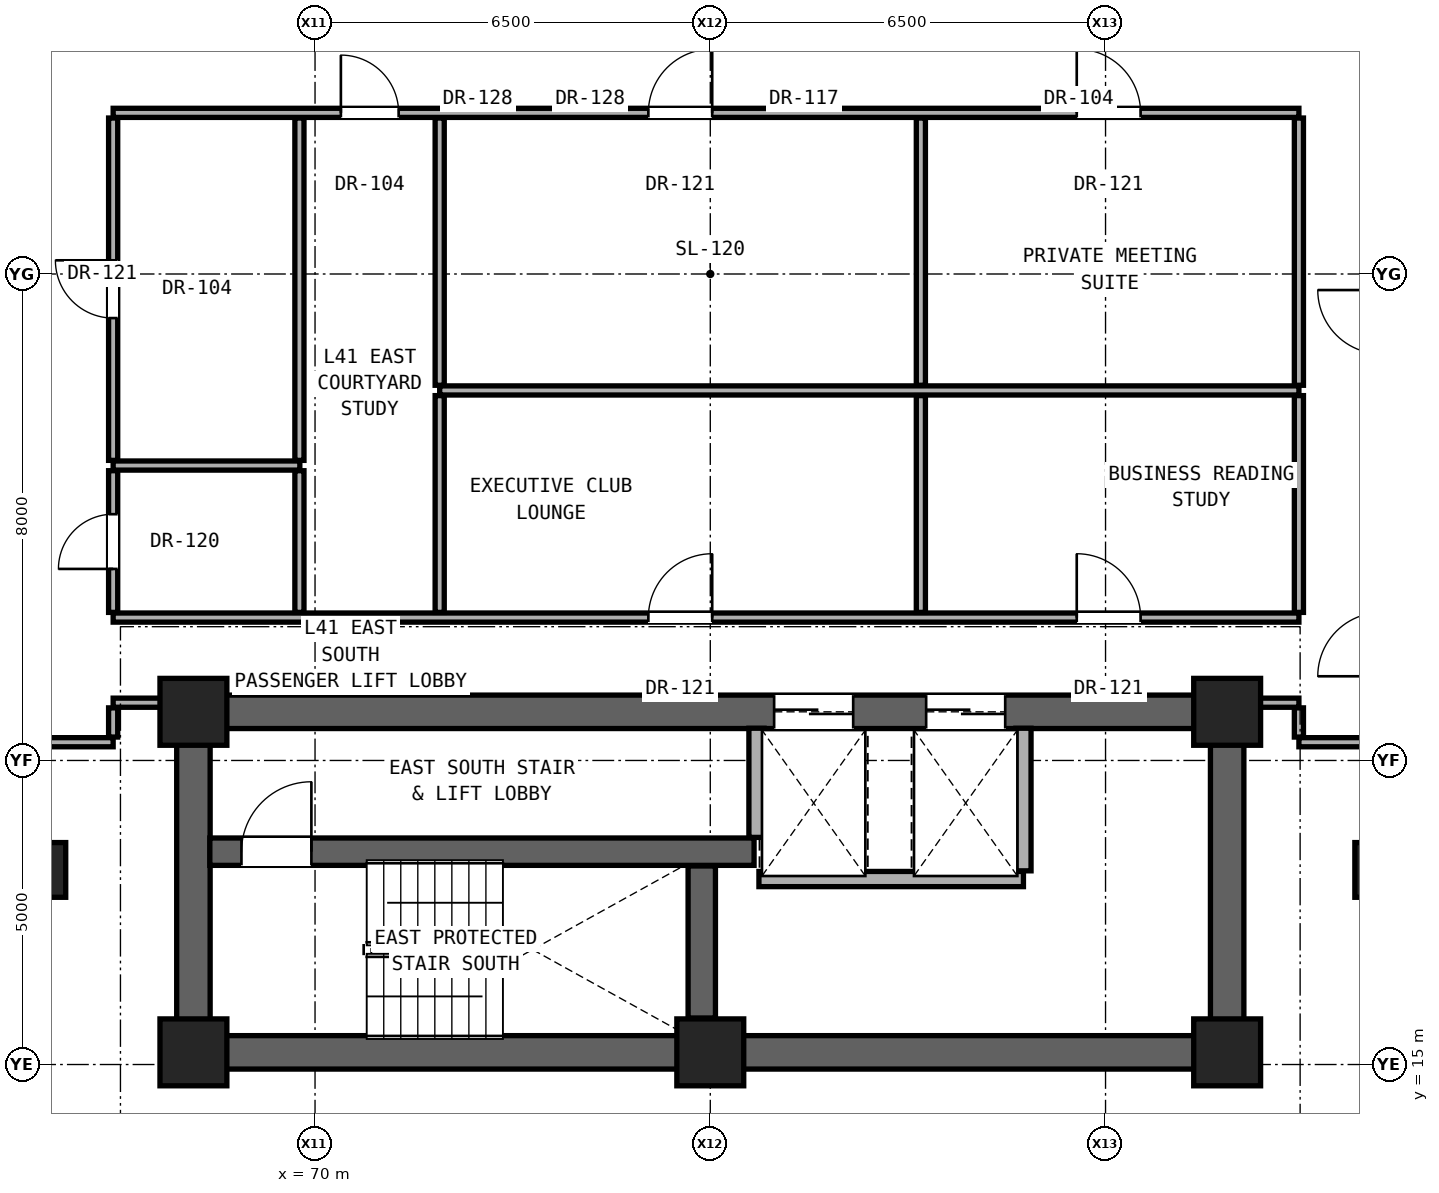
"""IFC4 building model, lengths in metres.
Left out: names, types, materials, properties, quantities, classifications, styles, units other than length and angle.
Written with IfcOpenShell. Run it as: python <this file> out.ifc"""

import sys

from ifc_helpers import new_model, si_unit, direction, frame, frame_2d, origin, origin_2d, place, context, subcontext, project, spatial, rectangle, extrude, element, fill, save


model = new_model("IFC4")
c1 = context("Model", 3, precision=1e-05, world=origin(), true_north=direction((0.0, 1.0)))
c2 = subcontext(c1, "Body", "Model", "MODEL_VIEW")
j1 = project(units=[si_unit("LENGTHUNIT", "METRE"), si_unit("PLANEANGLEUNIT", "RADIAN")], contexts=[c1])
p1 = place(None, origin())
s1 = spatial("IfcSite", under=j1, at=p1, CompositionType="ELEMENT")
p2 = place(p1, origin())
s2 = spatial("IfcBuilding", under=s1, at=p2, CompositionType="ELEMENT")
p3 = place(p2, frame((0.0, 0.0, 144.5)))
s3 = spatial("IfcBuildingStorey", under=s2, at=p3, CompositionType="ELEMENT", Elevation=144.5)
for number, where, z_axis, x_axis in (
    (1, (68.0, 15.2, 0.0), (0.0, 0.0, 1.0), (1.0, 0.0, 0.0)),
    (2, (76.5, 15.2, 0.0), (0.0, 0.0, 1.0), (1.0, 0.0, 0.0)),
    (3, (85.0, 15.2, 0.0), (0.0, 0.0, 1.0), (1.0, 0.0, 0.0)),
    (4, (68.0, 20.8, 0.0), (0.0, 0.0, 1.0), (1.0, 0.0, 0.0)),
    (5, (85.0, 20.8, 0.0), (0.0, 0.0, 1.0), (1.0, 0.0, 0.0)),
):
    element("IfcColumn", number, at=place(p3, frame(where, z_axis=z_axis, x_axis=x_axis)), inside=s3, PredefinedType="COLUMN", context=c2, shape_type="SweptSolid", body=[
        extrude(rectangle(XDim=1.1, YDim=1.1, at=origin_2d()), origin(), (0.0, 0.0, 1.0), 3.3),
    ])
for number, where, z_axis, x_axis in (
    (6, (65.6, 18.2, 0.0), (0.0, 0.0, 1.0), (1.0, 0.0, 0.0)),
    (7, (87.4, 18.2, 0.0), (0.0, 0.0, 1.0), (1.0, 0.0, 0.0)),
):
    element("IfcColumn", number, at=place(p3, frame(where, z_axis=z_axis, x_axis=x_axis)), inside=s3, PredefinedType="PILASTER", context=c2, shape_type="SweptSolid", body=[
        extrude(rectangle(XDim=0.6, YDim=0.9, at=origin_2d()), origin(), (0.0, 0.0, 1.0), 3.3),
    ])
p4 = place(p3, frame((68.0, 15.2, 0.0), z_axis=(0.0, 0.0, 1.0), x_axis=(1.0, 0.0, 0.0)))
e8 = element("IfcWall", 8, at=p4, inside=s3, PredefinedType="SHEAR", context=c2, shape_type="SweptSolid", body=[
    extrude(rectangle(XDim=17.0, YDim=0.55, at=frame_2d((8.5, 0.0))), origin(), (0.0, 0.0, 1.0), 2.94),
])
for number, where, z_axis, x_axis in (
    (9, (68.0, 15.2, 0.0), (0.0, 0.0, 1.0), (0.0, 1.0, 0.0)),
    (10, (85.0, 15.2, 0.0), (0.0, 0.0, 1.0), (0.0, 1.0, 0.0)),
):
    element("IfcWall", number, at=place(p3, frame(where, z_axis=z_axis, x_axis=x_axis)), inside=s3, PredefinedType="SHEAR", context=c2, shape_type="SweptSolid", body=[
        extrude(rectangle(XDim=5.6, YDim=0.55, at=frame_2d((2.8, 0.0))), origin(), (0.0, 0.0, 1.0), 2.94),
    ])
p5 = place(p3, frame((68.0, 20.8, 0.0), z_axis=(0.0, 0.0, 1.0), x_axis=(1.0, 0.0, 0.0)))
e11 = element("IfcWall", 11, at=p5, inside=s3, PredefinedType="SHEAR", context=c2, shape_type="SweptSolid", body=[
    extrude(rectangle(XDim=17.0, YDim=0.55, at=frame_2d((8.5, 0.0))), origin(), (0.0, 0.0, 1.0), 2.94),
])
p6 = place(p5, frame((9.55, 0.0, 0.0)))
e12 = element("IfcOpeningElement", 12, at=p6, cuts=e11, PredefinedType="OPENING", context=c2, shape_type="SweptSolid", body=[
    extrude(rectangle(XDim=1.3, YDim=2.3, at=frame_2d((0.65, 1.15))), frame((0.0, 0.285, 0.0), z_axis=(0.0, -1.0, 0.0), x_axis=(1.0, 0.0, 0.0)), (0.0, 0.0, 1.0), 0.57),
])
p7 = place(p5, frame((12.05, 0.0, 0.0)))
e13 = element("IfcOpeningElement", 13, at=p7, cuts=e11, PredefinedType="OPENING", context=c2, shape_type="SweptSolid", body=[
    extrude(rectangle(XDim=1.3, YDim=2.3, at=frame_2d((0.65, 1.15))), frame((0.0, 0.285, 0.0), z_axis=(0.0, -1.0, 0.0), x_axis=(1.0, 0.0, 0.0)), (0.0, 0.0, 1.0), 0.57),
])
p8 = place(p3, frame((77.3, 18.05, 0.0), z_axis=(0.0, 0.0, 1.0), x_axis=(1.0, 0.0, 0.0)))
e14 = element("IfcWall", 14, at=p8, inside=s3, PredefinedType="SOLIDWALL", context=c2, shape_type="SweptSolid", body=[
    extrude(rectangle(XDim=4.35, YDim=0.25, at=frame_2d((2.175, 0.0))), origin(), (0.0, 0.0, 1.0), 2.94),
])
p9 = place(p3, frame((68.27, 18.5, 0.0), z_axis=(0.0, 0.0, 1.0), x_axis=(1.0, 0.0, 0.0)))
e15 = element("IfcWall", 15, at=p9, inside=s3, PredefinedType="SHEAR", context=c2, shape_type="SweptSolid", body=[
    extrude(rectangle(XDim=8.95, YDim=0.45, at=frame_2d((4.475, 0.0))), origin(), (0.0, 0.0, 1.0), 2.94),
])
p10 = place(p9, frame((0.52, 0.0, 0.0)))
e16 = element("IfcOpeningElement", 16, at=p10, cuts=e15, PredefinedType="OPENING", context=c2, shape_type="SweptSolid", body=[
    extrude(rectangle(XDim=1.15, YDim=2.2, at=frame_2d((0.575, 1.1))), frame((0.0, 0.235, 0.0), z_axis=(0.0, -1.0, 0.0), x_axis=(1.0, 0.0, 0.0)), (0.0, 0.0, 1.0), 0.47),
])
p11 = place(p3, frame((65.32, 20.3, 0.0), z_axis=(0.0, 0.0, 1.0), x_axis=(1.0, 0.0, 0.0)))
e17 = element("IfcWall", 17, at=p11, inside=s3, PredefinedType="PARTITIONING", context=c2, shape_type="SweptSolid", body=[
    extrude(rectangle(XDim=1.36, YDim=0.15, at=frame_2d((0.68, 0.0))), origin(), (0.0, 0.0, 1.0), 2.94),
])
p12 = place(p3, frame((86.18, 20.3, 0.0), z_axis=(0.0, 0.0, 1.0), x_axis=(1.0, 0.0, 0.0)))
e18 = element("IfcWall", 18, at=p12, inside=s3, PredefinedType="PARTITIONING", context=c2, shape_type="SweptSolid", body=[
    extrude(rectangle(XDim=1.36, YDim=0.15, at=frame_2d((0.68, 0.0))), origin(), (0.0, 0.0, 1.0), 2.94),
])
p13 = place(p3, frame((66.68, 20.95, 0.0), z_axis=(0.0, 0.0, 1.0), x_axis=(1.0, 0.0, 0.0)))
e19 = element("IfcWall", 19, at=p13, inside=s3, PredefinedType="PARTITIONING", context=c2, shape_type="SweptSolid", body=[
    extrude(rectangle(XDim=1.05, YDim=0.15, at=frame_2d((0.525, 0.0))), origin(), (0.0, 0.0, 1.0), 2.332),
])
p14 = place(p3, frame((85.27, 20.95, 0.0), z_axis=(0.0, 0.0, 1.0), x_axis=(1.0, 0.0, 0.0)))
e20 = element("IfcWall", 20, at=p14, inside=s3, PredefinedType="PARTITIONING", context=c2, shape_type="SweptSolid", body=[
    extrude(rectangle(XDim=0.91, YDim=0.15, at=frame_2d((0.455, 0.0))), origin(), (0.0, 0.0, 1.0), 2.332),
])
p15 = place(p3, frame((66.68, 22.35, 0.0), z_axis=(0.0, 0.0, 1.0), x_axis=(1.0, 0.0, 0.0)))
e21 = element("IfcWall", 21, at=p15, inside=s3, PredefinedType="PARTITIONING", context=c2, shape_type="SweptSolid", body=[
    extrude(rectangle(XDim=19.5, YDim=0.15, at=frame_2d((9.75, 0.0))), origin(), (0.0, 0.0, 1.0), 2.316),
])
p16 = place(p15, frame((8.802, 0.0, 0.0)))
e22 = element("IfcOpeningElement", 22, at=p16, cuts=e21, PredefinedType="OPENING", context=c2, shape_type="SweptSolid", body=[
    extrude(rectangle(XDim=1.05, YDim=2.2, at=frame_2d((0.525, 1.1))), frame((0.0, 0.085, 0.0), z_axis=(0.0, -1.0, 0.0), x_axis=(1.0, 0.0, 0.0)), (0.0, 0.0, 1.0), 0.17),
])
p17 = place(p15, frame((15.846, 0.0, 0.0)))
e23 = element("IfcOpeningElement", 23, at=p17, cuts=e21, PredefinedType="OPENING", context=c2, shape_type="SweptSolid", body=[
    extrude(rectangle(XDim=1.05, YDim=2.2, at=frame_2d((0.525, 1.1))), frame((0.0, 0.085, 0.0), z_axis=(0.0, -1.0, 0.0), x_axis=(1.0, 0.0, 0.0)), (0.0, 0.0, 1.0), 0.17),
])
p18 = place(p3, frame((66.68, 24.85, 0.0), z_axis=(0.0, 0.0, 1.0), x_axis=(1.0, 0.0, 0.0)))
e24 = element("IfcWall", 24, at=p18, inside=s3, PredefinedType="PARTITIONING", context=c2, shape_type="SweptSolid", body=[
    extrude(rectangle(XDim=3.07, YDim=0.15, at=frame_2d((1.535, 0.0))), origin(), (0.0, 0.0, 1.0), 2.316),
])
p19 = place(p3, frame((72.05, 26.085, 0.0), z_axis=(0.0, 0.0, 1.0), x_axis=(1.0, 0.0, 0.0)))
e25 = element("IfcWall", 25, at=p19, inside=s3, PredefinedType="PARTITIONING", context=c2, shape_type="SweptSolid", body=[
    extrude(rectangle(XDim=14.13, YDim=0.15, at=frame_2d((7.065, 0.0))), origin(), (0.0, 0.0, 1.0), 2.316),
])
p20 = place(p3, frame((66.68, 30.65, 0.0), z_axis=(0.0, 0.0, 1.0), x_axis=(1.0, 0.0, 0.0)))
e26 = element("IfcWall", 26, at=p20, inside=s3, PredefinedType="PARTITIONING", context=c2, shape_type="SweptSolid", body=[
    extrude(rectangle(XDim=19.5, YDim=0.15, at=frame_2d((9.75, 0.0))), origin(), (0.0, 0.0, 1.0), 2.316),
])
p21 = place(p20, frame((3.745, 0.0, 0.0)))
e27 = element("IfcOpeningElement", 27, at=p21, cuts=e26, PredefinedType="OPENING", context=c2, shape_type="SweptSolid", body=[
    extrude(rectangle(XDim=0.95, YDim=2.15, at=frame_2d((0.475, 1.075))), frame((0.0, 0.085, 0.0), z_axis=(0.0, -1.0, 0.0), x_axis=(1.0, 0.0, 0.0)), (0.0, 0.0, 1.0), 0.17),
])
p22 = place(p20, frame((8.802, 0.0, 0.0)))
e28 = element("IfcOpeningElement", 28, at=p22, cuts=e26, PredefinedType="OPENING", context=c2, shape_type="SweptSolid", body=[
    extrude(rectangle(XDim=1.05, YDim=2.2, at=frame_2d((0.525, 1.1))), frame((0.0, 0.085, 0.0), z_axis=(0.0, -1.0, 0.0), x_axis=(1.0, 0.0, 0.0)), (0.0, 0.0, 1.0), 0.17),
])
p23 = place(p20, frame((15.846, 0.0, 0.0)))
e29 = element("IfcOpeningElement", 29, at=p23, cuts=e26, PredefinedType="OPENING", context=c2, shape_type="SweptSolid", body=[
    extrude(rectangle(XDim=1.05, YDim=2.2, at=frame_2d((0.525, 1.1))), frame((0.0, 0.085, 0.0), z_axis=(0.0, -1.0, 0.0), x_axis=(1.0, 0.0, 0.0)), (0.0, 0.0, 1.0), 0.17),
])
p24 = place(p3, frame((66.68, 20.385, 0.0), z_axis=(0.0, 0.0, 1.0), x_axis=(0.0, 1.0, 0.0)))
e30 = element("IfcWall", 30, at=p24, inside=s3, PredefinedType="PARTITIONING", context=c2, shape_type="SweptSolid", body=[
    extrude(rectangle(XDim=0.48, YDim=0.15, at=frame_2d((0.24, 0.0))), origin(), (0.0, 0.0, 1.0), 2.332),
])
p25 = place(p3, frame((66.68, 22.435, 0.0), z_axis=(0.0, 0.0, 1.0), x_axis=(0.0, 1.0, 0.0)))
e31 = element("IfcWall", 31, at=p25, inside=s3, PredefinedType="PARTITIONING", context=c2, shape_type="SweptSolid", body=[
    extrude(rectangle(XDim=2.33, YDim=0.15, at=frame_2d((1.165, 0.0))), origin(), (0.0, 0.0, 1.0), 2.94),
])
p26 = place(p25, frame((0.715, 0.0, 0.0)))
e32 = element("IfcOpeningElement", 32, at=p26, cuts=e31, PredefinedType="OPENING", context=c2, shape_type="SweptSolid", body=[
    extrude(rectangle(XDim=0.9, YDim=2.1, at=frame_2d((0.45, 1.05))), frame((0.0, 0.085, 0.0), z_axis=(0.0, -1.0, 0.0), x_axis=(1.0, 0.0, 0.0)), (0.0, 0.0, 1.0), 0.17),
])
p27 = place(p3, frame((66.68, 24.935, 0.0), z_axis=(0.0, 0.0, 1.0), x_axis=(0.0, 1.0, 0.0)))
e33 = element("IfcWall", 33, at=p27, inside=s3, PredefinedType="PARTITIONING", context=c2, shape_type="SweptSolid", body=[
    extrude(rectangle(XDim=5.63, YDim=0.15, at=frame_2d((2.815, 0.0))), origin(), (0.0, 0.0, 1.0), 2.316),
])
p28 = place(p27, frame((2.34, 0.0, 0.0)))
e34 = element("IfcOpeningElement", 34, at=p28, cuts=e33, PredefinedType="OPENING", context=c2, shape_type="SweptSolid", body=[
    extrude(rectangle(XDim=0.95, YDim=2.15, at=frame_2d((0.475, 1.075))), frame((0.0, 0.085, 0.0), z_axis=(0.0, -1.0, 0.0), x_axis=(1.0, 0.0, 0.0)), (0.0, 0.0, 1.0), 0.17),
])
p29 = place(p3, frame((69.743, 22.435, 0.0), z_axis=(0.0, 0.0, 1.0), x_axis=(0.0, 1.0, 0.0)))
e35 = element("IfcWall", 35, at=p29, inside=s3, PredefinedType="PARTITIONING", context=c2, shape_type="SweptSolid", body=[
    extrude(rectangle(XDim=2.33, YDim=0.15, at=frame_2d((1.165, 0.0))), origin(), (0.0, 0.0, 1.0), 2.94),
])
p30 = place(p3, frame((69.743, 24.935, 0.0), z_axis=(0.0, 0.0, 1.0), x_axis=(0.0, 1.0, 0.0)))
e36 = element("IfcWall", 36, at=p30, inside=s3, PredefinedType="PARTITIONING", context=c2, shape_type="SweptSolid", body=[
    extrude(rectangle(XDim=5.63, YDim=0.15, at=frame_2d((2.815, 0.0))), origin(), (0.0, 0.0, 1.0), 2.316),
])
p31 = place(p3, frame((72.05, 22.435, 0.0), z_axis=(0.0, 0.0, 1.0), x_axis=(0.0, 1.0, 0.0)))
e37 = element("IfcWall", 37, at=p31, inside=s3, PredefinedType="PARTITIONING", context=c2, shape_type="SweptSolid", body=[
    extrude(rectangle(XDim=3.565, YDim=0.15, at=frame_2d((1.782, 0.0))), origin(), (0.0, 0.0, 1.0), 2.94),
])
p32 = place(p3, frame((72.05, 26.17, 0.0), z_axis=(0.0, 0.0, 1.0), x_axis=(0.0, 1.0, 0.0)))
e38 = element("IfcWall", 38, at=p32, inside=s3, PredefinedType="PARTITIONING", context=c2, shape_type="SweptSolid", body=[
    extrude(rectangle(XDim=4.395, YDim=0.15, at=frame_2d((2.198, 0.0))), origin(), (0.0, 0.0, 1.0), 2.316),
])
p33 = place(p3, frame((76.36, 15.765, 0.0), z_axis=(0.0, 0.0, 1.0), x_axis=(0.0, 1.0, 0.0)))
e39 = element("IfcWall", 39, at=p33, inside=s3, PredefinedType="SHEAR", context=c2, shape_type="SweptSolid", body=[
    extrude(rectangle(XDim=2.5, YDim=0.45, at=frame_2d((1.25, 0.0))), origin(), (0.0, 0.0, 1.0), 2.94),
])
p34 = place(p3, frame((77.26, 18.735, 0.0), z_axis=(0.0, 0.0, 1.0), x_axis=(0.0, 1.0, 0.0)))
e40 = element("IfcWall", 40, at=p34, inside=s3, PredefinedType="SOLIDWALL", context=c2, shape_type="SweptSolid", body=[
    extrude(rectangle(XDim=1.795, YDim=0.25, at=frame_2d((0.897, 0.0))), origin(), (0.0, 0.0, 1.0), 2.94),
])
p35 = place(p3, frame((79.963, 22.435, 0.0), z_axis=(0.0, 0.0, 1.0), x_axis=(0.0, 1.0, 0.0)))
e41 = element("IfcWall", 41, at=p35, inside=s3, PredefinedType="PARTITIONING", context=c2, shape_type="SweptSolid", body=[
    extrude(rectangle(XDim=3.565, YDim=0.15, at=frame_2d((1.782, 0.0))), origin(), (0.0, 0.0, 1.0), 2.94),
])
p36 = place(p3, frame((79.963, 26.17, 0.0), z_axis=(0.0, 0.0, 1.0), x_axis=(0.0, 1.0, 0.0)))
e42 = element("IfcWall", 42, at=p36, inside=s3, PredefinedType="PARTITIONING", context=c2, shape_type="SweptSolid", body=[
    extrude(rectangle(XDim=4.395, YDim=0.15, at=frame_2d((2.198, 0.0))), origin(), (0.0, 0.0, 1.0), 2.316),
])
p37 = place(p3, frame((81.65, 18.185, 0.0), z_axis=(0.0, 0.0, 1.0), x_axis=(0.0, 1.0, 0.0)))
e43 = element("IfcWall", 43, at=p37, inside=s3, PredefinedType="SOLIDWALL", context=c2, shape_type="SweptSolid", body=[
    extrude(rectangle(XDim=2.345, YDim=0.25, at=frame_2d((1.172, 0.0))), origin(), (0.0, 0.0, 1.0), 2.94),
])
p38 = place(p3, frame((86.18, 20.385, 0.0), z_axis=(0.0, 0.0, 1.0), x_axis=(0.0, 1.0, 0.0)))
e44 = element("IfcWall", 44, at=p38, inside=s3, PredefinedType="PARTITIONING", context=c2, shape_type="SweptSolid", body=[
    extrude(rectangle(XDim=0.48, YDim=0.15, at=frame_2d((0.24, 0.0))), origin(), (0.0, 0.0, 1.0), 2.332),
])
p39 = place(p3, frame((86.18, 22.435, 0.0), z_axis=(0.0, 0.0, 1.0), x_axis=(0.0, 1.0, 0.0)))
e45 = element("IfcWall", 45, at=p39, inside=s3, PredefinedType="PARTITIONING", context=c2, shape_type="SweptSolid", body=[
    extrude(rectangle(XDim=3.565, YDim=0.15, at=frame_2d((1.782, 0.0))), origin(), (0.0, 0.0, 1.0), 2.94),
])
p40 = place(p3, frame((86.18, 26.17, 0.0), z_axis=(0.0, 0.0, 1.0), x_axis=(0.0, 1.0, 0.0)))
e46 = element("IfcWall", 46, at=p40, inside=s3, PredefinedType="PARTITIONING", context=c2, shape_type="SweptSolid", body=[
    extrude(rectangle(XDim=4.395, YDim=0.15, at=frame_2d((2.198, 0.0))), origin(), (0.0, 0.0, 1.0), 2.316),
])
p41 = place(p10, origin())
e47 = element("IfcDoor", 47, at=p41, inside=s3, OperationType="SINGLE_SWING_RIGHT", PredefinedType="DOOR", context=c2, shape_type="SweptSolid", body=[
    extrude(rectangle(XDim=1.15, YDim=2.2, at=frame_2d((0.575, 1.1))), frame((0.0, 0.025, 0.0), z_axis=(0.0, -1.0, 0.0), x_axis=(1.0, 0.0, 0.0)), (0.0, 0.0, 1.0), 0.05),
])
fill(e16, e47)
p42 = place(p26, origin())
e48 = element("IfcDoor", 48, at=p42, inside=s3, OperationType="SINGLE_SWING_LEFT", PredefinedType="DOOR", context=c2, shape_type="SweptSolid", body=[
    extrude(rectangle(XDim=0.9, YDim=2.1, at=frame_2d((0.45, 1.05))), frame((0.0, 0.025, 0.0), z_axis=(0.0, -1.0, 0.0), x_axis=(1.0, 0.0, 0.0)), (0.0, 0.0, 1.0), 0.05),
])
fill(e32, e48)
p43 = place(p28, origin())
e49 = element("IfcDoor", 49, at=p43, inside=s3, OperationType="SINGLE_SWING_RIGHT", PredefinedType="DOOR", context=c2, shape_type="SweptSolid", body=[
    extrude(rectangle(XDim=0.95, YDim=2.15, at=frame_2d((0.475, 1.075))), frame((0.0, 0.025, 0.0), z_axis=(0.0, -1.0, 0.0), x_axis=(1.0, 0.0, 0.0)), (0.0, 0.0, 1.0), 0.05),
])
fill(e34, e49)
p44 = place(p21, origin())
e50 = element("IfcDoor", 50, at=p44, inside=s3, OperationType="SINGLE_SWING_LEFT", PredefinedType="DOOR", context=c2, shape_type="SweptSolid", body=[
    extrude(rectangle(XDim=0.95, YDim=2.15, at=frame_2d((0.475, 1.075))), frame((0.0, 0.025, 0.0), z_axis=(0.0, -1.0, 0.0), x_axis=(1.0, 0.0, 0.0)), (0.0, 0.0, 1.0), 0.05),
])
fill(e27, e50)
p45 = place(p16, origin())
e51 = element("IfcDoor", 51, at=p45, inside=s3, OperationType="SINGLE_SWING_RIGHT", PredefinedType="DOOR", context=c2, shape_type="SweptSolid", body=[
    extrude(rectangle(XDim=1.05, YDim=2.2, at=frame_2d((0.525, 1.1))), frame((0.0, 0.025, 0.0), z_axis=(0.0, -1.0, 0.0), x_axis=(1.0, 0.0, 0.0)), (0.0, 0.0, 1.0), 0.05),
])
fill(e22, e51)
p46 = place(p17, origin())
e52 = element("IfcDoor", 52, at=p46, inside=s3, OperationType="SINGLE_SWING_LEFT", PredefinedType="DOOR", context=c2, shape_type="SweptSolid", body=[
    extrude(rectangle(XDim=1.05, YDim=2.2, at=frame_2d((0.525, 1.1))), frame((0.0, 0.025, 0.0), z_axis=(0.0, -1.0, 0.0), x_axis=(1.0, 0.0, 0.0)), (0.0, 0.0, 1.0), 0.05),
])
fill(e23, e52)
p47 = place(p22, origin())
e53 = element("IfcDoor", 53, at=p47, inside=s3, OperationType="SINGLE_SWING_RIGHT", PredefinedType="DOOR", context=c2, shape_type="SweptSolid", body=[
    extrude(rectangle(XDim=1.05, YDim=2.2, at=frame_2d((0.525, 1.1))), frame((0.0, 0.025, 0.0), z_axis=(0.0, -1.0, 0.0), x_axis=(1.0, 0.0, 0.0)), (0.0, 0.0, 1.0), 0.05),
])
fill(e28, e53)
p48 = place(p23, origin())
e54 = element("IfcDoor", 54, at=p48, inside=s3, OperationType="SINGLE_SWING_LEFT", PredefinedType="DOOR", context=c2, shape_type="SweptSolid", body=[
    extrude(rectangle(XDim=1.05, YDim=2.2, at=frame_2d((0.525, 1.1))), frame((0.0, 0.025, 0.0), z_axis=(0.0, -1.0, 0.0), x_axis=(1.0, 0.0, 0.0)), (0.0, 0.0, 1.0), 0.05),
])
fill(e29, e54)
p49 = place(p6, origin())
e55 = element("IfcDoor", 55, at=p49, inside=s3, OperationType="DOUBLE_DOOR_SLIDING", PredefinedType="DOOR", context=c2, shape_type="SweptSolid", body=[
    extrude(rectangle(XDim=1.3, YDim=2.3, at=frame_2d((0.65, 1.15))), frame((0.0, 0.025, 0.0), z_axis=(0.0, -1.0, 0.0), x_axis=(1.0, 0.0, 0.0)), (0.0, 0.0, 1.0), 0.05),
])
fill(e12, e55)
p50 = place(p7, origin())
e56 = element("IfcDoor", 56, at=p50, inside=s3, OperationType="DOUBLE_DOOR_SLIDING", PredefinedType="DOOR", context=c2, shape_type="SweptSolid", body=[
    extrude(rectangle(XDim=1.3, YDim=2.3, at=frame_2d((0.65, 1.15))), frame((0.0, 0.025, 0.0), z_axis=(0.0, -1.0, 0.0), x_axis=(1.0, 0.0, 0.0)), (0.0, 0.0, 1.0), 0.05),
])
fill(e13, e56)
save(model, sys.argv[1])
